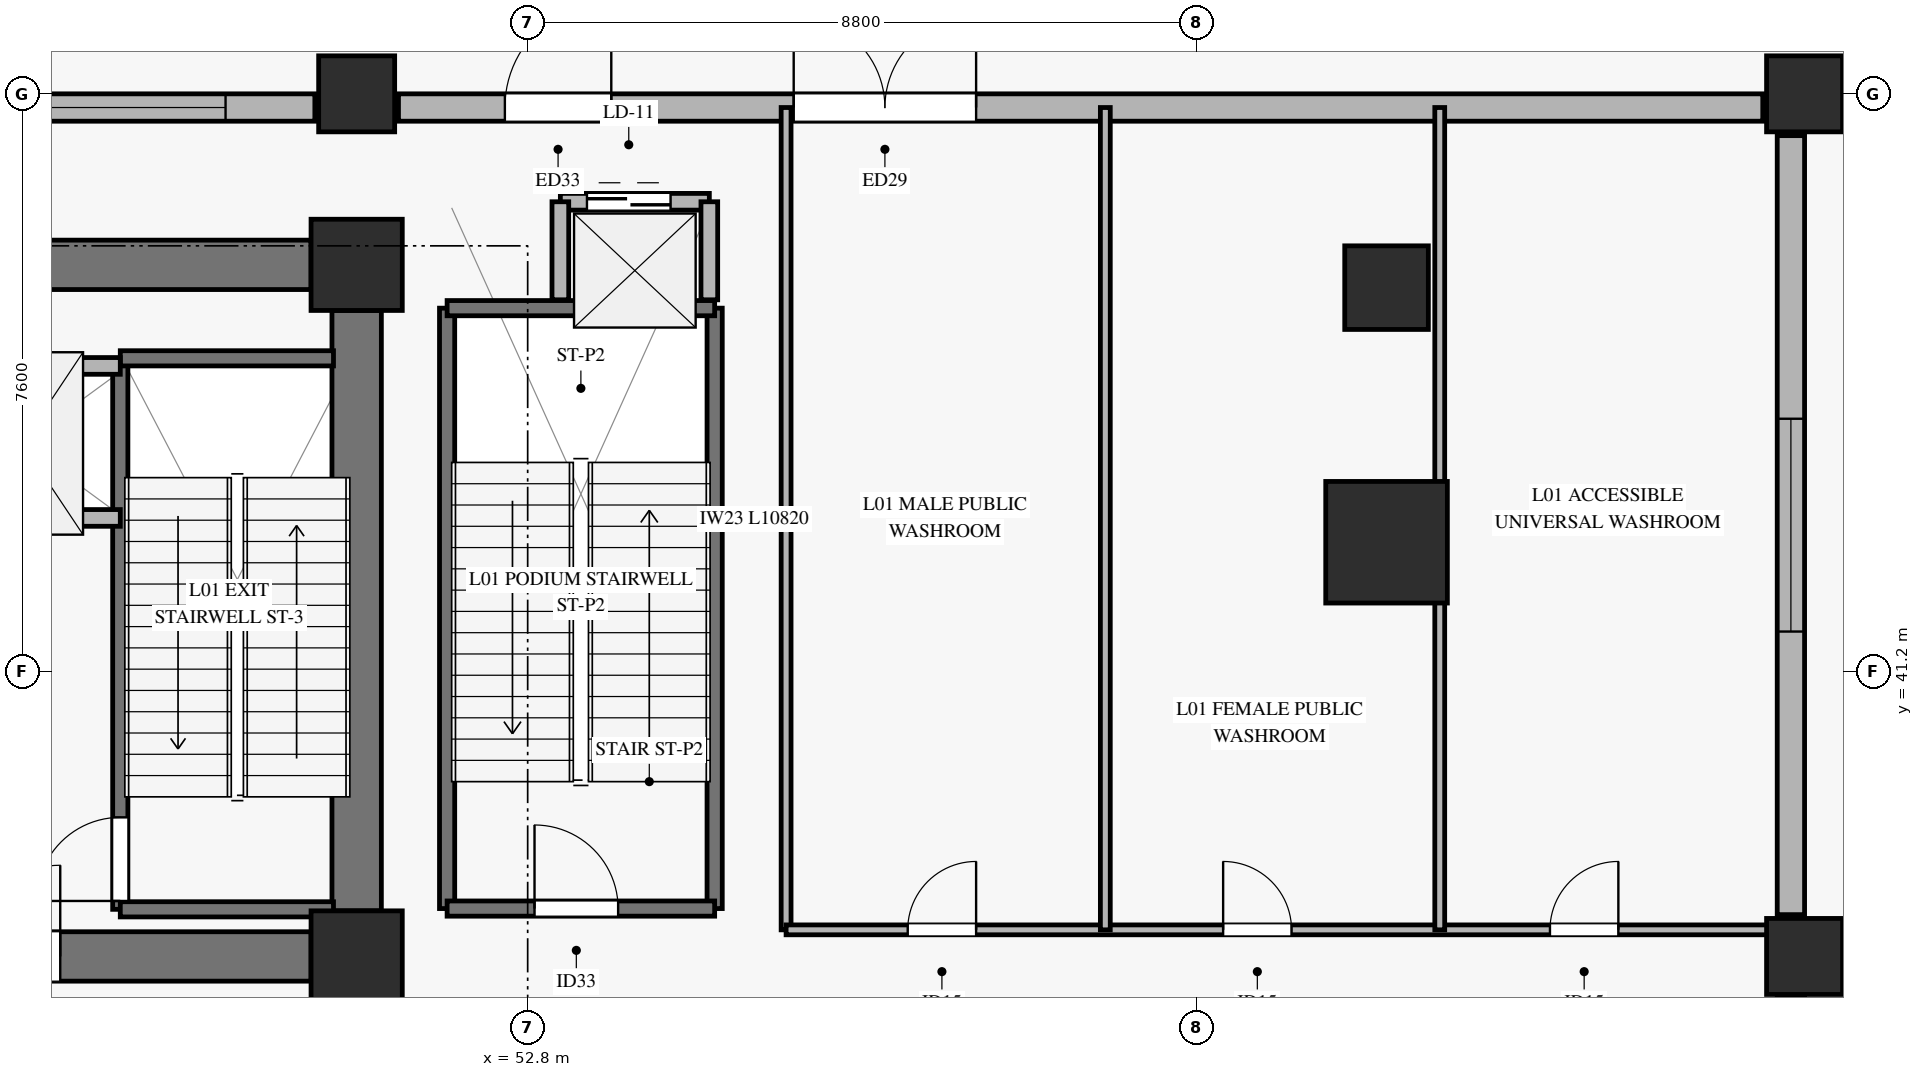
"""IFC4 building model, lengths in metres.
Left out: names, types, materials, properties, quantities, classifications, styles, units other than length and angle.
Written with IfcOpenShell. Run it as: python <this file> out.ifc"""

import sys

from ifc_helpers import new_model, si_unit, direction, frame, frame_2d, origin, origin_2d, place, context, subcontext, project, spatial, rectangle, hollow_rectangle, extrude, source, transform, mapped, element, fill, save


model = new_model("IFC4")
c1 = context("Model", 3, precision=1e-05, world=origin(), true_north=direction((0.0, 1.0)))
c2 = subcontext(c1, "Body", "Model", "MODEL_VIEW")
j1 = project(units=[si_unit("LENGTHUNIT", "METRE"), si_unit("PLANEANGLEUNIT", "RADIAN")], contexts=[c1])
p1 = place(None, origin())
s1 = spatial("IfcSite", under=j1, at=p1, CompositionType="ELEMENT")
p2 = place(p1, origin())
s2 = spatial("IfcBuilding", under=s1, at=p2, CompositionType="ELEMENT")
p3 = place(p2, origin())
s3 = spatial("IfcBuildingStorey", under=s2, at=p3, CompositionType="ELEMENT", Elevation=0.0)
m1 = source(origin(), c2, "Body", "SweptSolid", [
    extrude(rectangle(XDim=1.2, YDim=1.2, at=origin_2d()), origin(), (0.0, 0.0, 1.0), 5.34),
])
for number, where, z_axis, x_axis in (
    (1, (50.55, 37.45, 0.0), (0.0, 0.0, 1.0), (1.0, 0.0, 0.0)),
    (2, (50.55, 46.55, 0.0), (0.0, 0.0, 1.0), (1.0, 0.0, 0.0)),
):
    element("IfcColumn", number, at=place(p3, frame(where, z_axis=z_axis, x_axis=x_axis)), inside=s3, PredefinedType="PILASTER", context=c2, shape_type="MappedRepresentation", body=[
        mapped(m1, transform((0.0, 0.0, 0.0), x_axis=(1.0, 0.0, 0.0), y_axis=(0.0, 1.0, 0.0), z_axis=(0.0, 0.0, 1.0), scale=1.0)),
    ])
p4 = place(p3, frame((44.9, 46.55, 0.0), z_axis=(0.0, 0.0, 1.0), x_axis=(1.0, 0.0, 0.0)))
e3 = element("IfcWall", 3, at=p4, inside=s3, PredefinedType="SHEAR", context=c2, shape_type="SweptSolid", body=[
    extrude(rectangle(XDim=5.05, YDim=0.65, at=frame_2d((2.525, 0.0))), origin(), (0.0, 0.0, 1.0), 5.34),
])
p5 = place(p3, frame((44.9, 37.45, 0.0), z_axis=(0.0, 0.0, 1.0), x_axis=(1.0, 0.0, 0.0)))
e4 = element("IfcWall", 4, at=p5, inside=s3, PredefinedType="SHEAR", context=c2, shape_type="SweptSolid", body=[
    extrude(rectangle(XDim=5.05, YDim=0.65, at=frame_2d((2.525, 0.0))), origin(), (0.0, 0.0, 1.0), 5.34),
])
p6 = place(p5, frame((0.55, 0.0, 0.0)))
e5 = element("IfcOpeningElement", 5, at=p6, cuts=e4, PredefinedType="OPENING", context=c2, shape_type="SweptSolid", body=[
    extrude(rectangle(XDim=1.2, YDim=2.15, at=frame_2d((0.6, 1.075))), frame((0.0, 0.335, 0.0), z_axis=(0.0, -1.0, 0.0), x_axis=(1.0, 0.0, 0.0)), (0.0, 0.0, 1.0), 0.67),
])
p7 = place(p3, frame((50.55, 38.05, 0.0), z_axis=(0.0, 0.0, 1.0), x_axis=(0.0, 1.0, 0.0)))
e6 = element("IfcWall", 6, at=p7, inside=s3, PredefinedType="SHEAR", context=c2, shape_type="SweptSolid", body=[
    extrude(rectangle(XDim=7.9, YDim=0.65, at=frame_2d((3.95, 0.0))), origin(), (0.0, 0.0, 1.0), 5.34),
])
m2 = source(origin(), c2, "Body", "SweptSolid", [
    extrude(hollow_rectangle(XDim=1.6, YDim=1.6, WallThickness=0.075, at=origin_2d()), origin(), (0.0, 0.0, 1.0), 5.34),
])
p8 = place(p3, frame((64.1, 42.9, 0.0), z_axis=(0.0, 0.0, 1.0), x_axis=(1.0, 0.0, 0.0)))
e7 = element("IfcColumn", 7, at=p8, inside=s3, PredefinedType="COLUMN", context=c2, shape_type="MappedRepresentation", body=[
    mapped(m2, transform((0.0, 0.0, 0.0), x_axis=(1.0, 0.0, 0.0), y_axis=(0.0, 1.0, 0.0), z_axis=(0.0, 0.0, 1.0), scale=1.0)),
])
m3 = source(origin(), c2, "Body", "SweptSolid", [
    extrude(hollow_rectangle(XDim=1.1, YDim=1.1, WallThickness=0.05, at=origin_2d()), origin(), (0.0, 0.0, 1.0), 5.34),
])
p9 = place(p3, frame((64.1, 46.25, 0.0), z_axis=(0.0, 0.0, 1.0), x_axis=(1.0, 0.0, 0.0)))
e8 = element("IfcColumn", 8, at=p9, inside=s3, PredefinedType="COLUMN", context=c2, shape_type="MappedRepresentation", body=[
    mapped(m3, transform((0.0, 0.0, 0.0), x_axis=(1.0, 0.0, 0.0), y_axis=(0.0, 1.0, 0.0), z_axis=(0.0, 0.0, 1.0), scale=1.0)),
])
m4 = source(origin(), c2, "Body", "SweptSolid", [
    extrude(hollow_rectangle(XDim=1.0, YDim=1.0, WallThickness=0.045, at=origin_2d()), origin(), (0.0, 0.0, 1.0), 5.34),
])
for number, where, z_axis, x_axis in (
    (9, (69.6, 37.45, 0.0), (0.0, 0.0, 1.0), (1.0, 0.0, 0.0)),
    (10, (50.55, 48.8, 0.0), (0.0, 0.0, 1.0), (1.0, 0.0, 0.0)),
    (11, (69.6, 48.8, 0.0), (0.0, 0.0, 1.0), (1.0, 0.0, 0.0)),
):
    element("IfcColumn", number, at=place(p3, frame(where, z_axis=z_axis, x_axis=x_axis)), inside=s3, PredefinedType="COLUMN", context=c2, shape_type="MappedRepresentation", body=[
        mapped(m4, transform((0.0, 0.0, 0.0), x_axis=(1.0, 0.0, 0.0), y_axis=(0.0, 1.0, 0.0), z_axis=(0.0, 0.0, 1.0), scale=1.0)),
    ])
p10 = place(p3, frame((44.85, 48.62, 0.0), z_axis=(0.0, 0.0, 1.0), x_axis=(1.0, 0.0, 0.0)))
e12 = element("IfcWall", 12, at=p10, inside=s3, PredefinedType="SOLIDWALL", context=c2, shape_type="SweptSolid", body=[
    extrude(rectangle(XDim=5.15, YDim=0.36, at=frame_2d((2.575, 0.0))), origin(), (0.0, 0.0, 1.0), 4.22),
])
p11 = place(p10, frame((1.175, 0.0, 0.72)))
e13 = element("IfcOpeningElement", 13, at=p11, cuts=e12, PredefinedType="OPENING", context=c2, shape_type="SweptSolid", body=[
    extrude(rectangle(XDim=2.8, YDim=2.0, at=frame_2d((1.4, 1.0))), frame((0.0, 0.19, 0.0), z_axis=(0.0, -1.0, 0.0), x_axis=(1.0, 0.0, 0.0)), (0.0, 0.0, 1.0), 0.38),
])
p12 = place(p3, frame((51.1, 48.62, 0.0), z_axis=(0.0, 0.0, 1.0), x_axis=(1.0, 0.0, 0.0)))
e14 = element("IfcWall", 14, at=p12, inside=s3, PredefinedType="SOLIDWALL", context=c2, shape_type="SweptSolid", body=[
    extrude(rectangle(XDim=17.95, YDim=0.36, at=frame_2d((8.975, 0.0))), origin(), (0.0, 0.0, 1.0), 4.22),
])
p13 = place(p12, frame((1.4, 0.0, 0.0)))
e15 = element("IfcOpeningElement", 15, at=p13, cuts=e14, PredefinedType="OPENING", context=c2, shape_type="SweptSolid", body=[
    extrude(rectangle(XDim=1.4, YDim=2.2, at=frame_2d((0.7, 1.1))), frame((0.0, 0.19, 0.0), z_axis=(0.0, -1.0, 0.0), x_axis=(1.0, 0.0, 0.0)), (0.0, 0.0, 1.0), 0.38),
])
p14 = place(p12, frame((5.2, 0.0, 0.0)))
e16 = element("IfcOpeningElement", 16, at=p14, cuts=e14, PredefinedType="OPENING", context=c2, shape_type="SweptSolid", body=[
    extrude(rectangle(XDim=2.4, YDim=2.6, at=frame_2d((1.2, 1.3))), frame((0.0, 0.19, 0.0), z_axis=(0.0, -1.0, 0.0), x_axis=(1.0, 0.0, 0.0)), (0.0, 0.0, 1.0), 0.38),
])
p15 = place(p3, frame((69.42, 38.0, 0.0), z_axis=(0.0, 0.0, 1.0), x_axis=(0.0, 1.0, 0.0)))
e17 = element("IfcWall", 17, at=p15, inside=s3, PredefinedType="SOLIDWALL", context=c2, shape_type="SweptSolid", body=[
    extrude(rectangle(XDim=10.25, YDim=0.36, at=frame_2d((5.125, 0.0))), origin(), (0.0, 0.0, 1.0), 4.22),
])
p16 = place(p15, frame((3.725, 0.0, 0.72)))
e18 = element("IfcOpeningElement", 18, at=p16, cuts=e17, PredefinedType="OPENING", context=c2, shape_type="SweptSolid", body=[
    extrude(rectangle(XDim=2.8, YDim=2.0, at=frame_2d((1.4, 1.0))), frame((0.0, 0.19, 0.0), z_axis=(0.0, -1.0, 0.0), x_axis=(1.0, 0.0, 0.0)), (0.0, 0.0, 1.0), 0.38),
])
p17 = place(p3, frame((47.44, 38.07, 0.0), z_axis=(0.0, 0.0, 1.0), x_axis=(0.0, 1.0, 0.0)))
e19 = element("IfcWall", 19, at=p17, inside=s3, PredefinedType="SOLIDWALL", context=c2, shape_type="SweptSolid", body=[
    extrude(rectangle(XDim=7.25, YDim=0.2, at=frame_2d((3.625, 0.0))), origin(), (0.0, 0.0, 1.0), 5.6),
])
p18 = place(p17, frame((0.11, 0.0, 0.0)))
e20 = element("IfcOpeningElement", 20, at=p18, cuts=e19, PredefinedType="OPENING", context=c2, shape_type="SweptSolid", body=[
    extrude(rectangle(XDim=1.1, YDim=2.15, at=frame_2d((0.55, 1.075))), frame((0.0, 0.11, 0.0), z_axis=(0.0, -1.0, 0.0), x_axis=(1.0, 0.0, 0.0)), (0.0, 0.0, 1.0), 0.22),
])
for number, where, z_axis, x_axis in (
    (21, (47.44, 45.32, 0.0), (0.0, 0.0, 1.0), (1.0, 0.0, 0.0)),
    (22, (47.44, 38.07, 0.0), (0.0, 0.0, 1.0), (1.0, 0.0, 0.0)),
):
    element("IfcWall", number, at=place(p3, frame(where, z_axis=z_axis, x_axis=x_axis)), inside=s3, PredefinedType="SOLIDWALL", context=c2, shape_type="SweptSolid", body=[
        extrude(rectangle(XDim=2.805, YDim=0.2, at=frame_2d((1.403, 0.0))), origin(), (0.0, 0.0, 1.0), 5.6),
    ])
p19 = place(p3, frame((44.72, 43.22, 0.0), z_axis=(0.0, 0.0, 1.0), x_axis=(1.0, 0.0, 0.0)))
e23 = element("IfcWall", 23, at=p19, inside=s3, PredefinedType="SOLIDWALL", context=c2, shape_type="SweptSolid", body=[
    extrude(rectangle(XDim=2.72, YDim=0.22, at=frame_2d((1.36, 0.0))), origin(), (0.0, 0.0, 1.0), 5.34),
])
p20 = place(p19, frame((0.7, 0.0, 0.0)))
e24 = element("IfcOpeningElement", 24, at=p20, cuts=e23, PredefinedType="OPENING", context=c2, shape_type="SweptSolid", body=[
    extrude(rectangle(XDim=1.1, YDim=2.2, at=frame_2d((0.55, 1.1))), frame((0.0, 0.12, 0.0), z_axis=(0.0, -1.0, 0.0), x_axis=(1.0, 0.0, 0.0)), (0.0, 0.0, 1.0), 0.24),
])
p21 = place(p3, frame((44.72, 45.22, 0.0), z_axis=(0.0, 0.0, 1.0), x_axis=(1.0, 0.0, 0.0)))
e25 = element("IfcWall", 25, at=p21, inside=s3, PredefinedType="SOLIDWALL", context=c2, shape_type="SweptSolid", body=[
    extrude(rectangle(XDim=2.72, YDim=0.22, at=frame_2d((1.36, 0.0))), origin(), (0.0, 0.0, 1.0), 5.34),
])
for number, where, z_axis, x_axis in (
    (26, (51.74, 38.08, 0.0), (0.0, 0.0, 1.0), (0.0, 1.0, 0.0)),
    (27, (55.26, 38.08, 0.0), (0.0, 0.0, 1.0), (0.0, 1.0, 0.0)),
):
    element("IfcWall", number, at=place(p3, frame(where, z_axis=z_axis, x_axis=x_axis)), inside=s3, PredefinedType="SOLIDWALL", context=c2, shape_type="SweptSolid", body=[
        extrude(rectangle(XDim=7.9, YDim=0.2, at=frame_2d((3.95, 0.0))), origin(), (0.0, 0.0, 1.0), 5.6),
    ])
p22 = place(p3, frame((51.74, 45.98, 0.0), z_axis=(0.0, 0.0, 1.0), x_axis=(1.0, 0.0, 0.0)))
e28 = element("IfcWall", 28, at=p22, inside=s3, PredefinedType="SOLIDWALL", context=c2, shape_type="SweptSolid", body=[
    extrude(rectangle(XDim=3.52, YDim=0.2, at=frame_2d((1.76, 0.0))), origin(), (0.0, 0.0, 1.0), 5.6),
])
p23 = place(p3, frame((51.74, 38.08, 0.0), z_axis=(0.0, 0.0, 1.0), x_axis=(1.0, 0.0, 0.0)))
e29 = element("IfcWall", 29, at=p23, inside=s3, PredefinedType="SOLIDWALL", context=c2, shape_type="SweptSolid", body=[
    extrude(rectangle(XDim=3.52, YDim=0.2, at=frame_2d((1.76, 0.0))), origin(), (0.0, 0.0, 1.0), 5.6),
])
p24 = place(p23, frame((1.15, 0.0, 0.0)))
e30 = element("IfcOpeningElement", 30, at=p24, cuts=e29, PredefinedType="OPENING", context=c2, shape_type="SweptSolid", body=[
    extrude(rectangle(XDim=1.1, YDim=2.15, at=frame_2d((0.55, 1.075))), frame((0.0, 0.11, 0.0), z_axis=(0.0, -1.0, 0.0), x_axis=(1.0, 0.0, 0.0)), (0.0, 0.0, 1.0), 0.22),
])
p25 = place(p3, frame((53.23, 47.38, 0.0), z_axis=(0.0, 0.0, 1.0), x_axis=(1.0, 0.0, 0.0)))
e31 = element("IfcWall", 31, at=p25, inside=s3, PredefinedType="SOLIDWALL", context=c2, shape_type="SweptSolid", body=[
    extrude(rectangle(XDim=1.96, YDim=0.22, at=frame_2d((0.98, 0.0))), origin(), (0.0, 0.0, 1.0), 5.34),
])
p26 = place(p25, frame((0.35, 0.0, 0.0)))
e32 = element("IfcOpeningElement", 32, at=p26, cuts=e31, PredefinedType="OPENING", context=c2, shape_type="SweptSolid", body=[
    extrude(rectangle(XDim=1.1, YDim=2.2, at=frame_2d((0.55, 1.1))), frame((0.0, 0.12, 0.0), z_axis=(0.0, -1.0, 0.0), x_axis=(1.0, 0.0, 0.0)), (0.0, 0.0, 1.0), 0.24),
])
for number, where, z_axis, x_axis in (
    (33, (53.23, 46.09, 0.0), (0.0, 0.0, 1.0), (0.0, 1.0, 0.0)),
    (34, (55.19, 46.09, 0.0), (0.0, 0.0, 1.0), (0.0, 1.0, 0.0)),
):
    element("IfcWall", number, at=place(p3, frame(where, z_axis=z_axis, x_axis=x_axis)), inside=s3, PredefinedType="SOLIDWALL", context=c2, shape_type="SweptSolid", body=[
        extrude(rectangle(XDim=1.29, YDim=0.22, at=frame_2d((0.645, 0.0))), origin(), (0.0, 0.0, 1.0), 5.34),
    ])
p27 = place(p3, frame((56.2, 37.8, 0.0), z_axis=(0.0, 0.0, 1.0), x_axis=(0.0, 1.0, 0.0)))
e35 = element("IfcWall", 35, at=p27, inside=s3, PredefinedType="PARTITIONING", context=c2, shape_type="SweptSolid", body=[
    extrude(rectangle(XDim=10.82, YDim=0.13, at=frame_2d((5.41, 0.0))), origin(), (0.0, 0.0, 1.0), 5.34),
])
p28 = place(p3, frame((56.2, 37.8, 0.0), z_axis=(0.0, 0.0, 1.0), x_axis=(1.0, 0.0, 0.0)))
e36 = element("IfcWall", 36, at=p28, inside=s3, PredefinedType="PARTITIONING", context=c2, shape_type="SweptSolid", body=[
    extrude(rectangle(XDim=13.22, YDim=0.13, at=frame_2d((6.61, 0.0))), origin(), (0.0, 0.0, 1.0), 4.225),
])
p29 = place(p28, frame((1.6, 0.0, 0.0)))
e37 = element("IfcOpeningElement", 37, at=p29, cuts=e36, PredefinedType="OPENING", context=c2, shape_type="SweptSolid", body=[
    extrude(rectangle(XDim=0.9, YDim=2.1, at=frame_2d((0.45, 1.05))), frame((0.0, 0.075, 0.0), z_axis=(0.0, -1.0, 0.0), x_axis=(1.0, 0.0, 0.0)), (0.0, 0.0, 1.0), 0.15),
])
p30 = place(p28, frame((5.75, 0.0, 0.0)))
e38 = element("IfcOpeningElement", 38, at=p30, cuts=e36, PredefinedType="OPENING", context=c2, shape_type="SweptSolid", body=[
    extrude(rectangle(XDim=0.9, YDim=2.1, at=frame_2d((0.45, 1.05))), frame((0.0, 0.075, 0.0), z_axis=(0.0, -1.0, 0.0), x_axis=(1.0, 0.0, 0.0)), (0.0, 0.0, 1.0), 0.15),
])
p31 = place(p28, frame((10.05, 0.0, 0.0)))
e39 = element("IfcOpeningElement", 39, at=p31, cuts=e36, PredefinedType="OPENING", context=c2, shape_type="SweptSolid", body=[
    extrude(rectangle(XDim=0.9, YDim=2.1, at=frame_2d((0.45, 1.05))), frame((0.0, 0.075, 0.0), z_axis=(0.0, -1.0, 0.0), x_axis=(1.0, 0.0, 0.0)), (0.0, 0.0, 1.0), 0.15),
])
p32 = place(p3, frame((60.4, 37.8, 0.0), z_axis=(0.0, 0.0, 1.0), x_axis=(0.0, 1.0, 0.0)))
e40 = element("IfcWall", 40, at=p32, inside=s3, PredefinedType="PARTITIONING", context=c2, shape_type="SweptSolid", body=[
    extrude(rectangle(XDim=10.82, YDim=0.13, at=frame_2d((5.41, 0.0))), origin(), (0.0, 0.0, 1.0), 5.34),
])
p33 = place(p3, frame((64.8, 37.8, 0.0), z_axis=(0.0, 0.0, 1.0), x_axis=(0.0, 1.0, 0.0)))
e41 = element("IfcWall", 41, at=p33, inside=s3, PredefinedType="PARTITIONING", context=c2, shape_type="SweptSolid", body=[
    extrude(rectangle(XDim=10.82, YDim=0.13, at=frame_2d((5.41, 0.0))), origin(), (0.0, 0.0, 1.0), 4.225),
])
m5 = source(origin(), c2, "Body", "SweptSolid", [
    extrude(rectangle(XDim=2.8, YDim=2.0, at=frame_2d((1.4, 1.0))), frame((0.0, 0.03, 0.0), z_axis=(0.0, -1.0, 0.0), x_axis=(1.0, 0.0, 0.0)), (0.0, 0.0, 1.0), 0.06),
])
p34 = place(p11, origin())
e42 = element("IfcWindow", 42, at=p34, inside=s3, PartitioningType="SINGLE_PANEL", PredefinedType="WINDOW", context=c2, shape_type="MappedRepresentation", body=[
    mapped(m5, transform((0.0, 0.0, 0.0), x_axis=(1.0, 0.0, 0.0), y_axis=(0.0, 1.0, 0.0), z_axis=(0.0, 0.0, 1.0), scale=1.0)),
])
fill(e13, e42)
m6 = source(origin(), c2, "Body", "SweptSolid", [
    extrude(rectangle(XDim=1.4, YDim=2.2, at=frame_2d((0.7, 1.1))), frame((0.0, 0.025, 0.0), z_axis=(0.0, -1.0, 0.0), x_axis=(1.0, 0.0, 0.0)), (0.0, 0.0, 1.0), 0.05),
])
p35 = place(p13, origin())
e43 = element("IfcDoor", 43, at=p35, inside=s3, OperationType="SINGLE_SWING_RIGHT", PredefinedType="DOOR", context=c2, shape_type="MappedRepresentation", body=[
    mapped(m6, transform((0.0, 0.0, 0.0), x_axis=(1.0, 0.0, 0.0), y_axis=(0.0, 1.0, 0.0), z_axis=(0.0, 0.0, 1.0), scale=1.0)),
])
fill(e15, e43)
m7 = source(origin(), c2, "Body", "SweptSolid", [
    extrude(rectangle(XDim=2.4, YDim=2.6, at=frame_2d((1.2, 1.3))), frame((0.0, 0.025, 0.0), z_axis=(0.0, -1.0, 0.0), x_axis=(1.0, 0.0, 0.0)), (0.0, 0.0, 1.0), 0.05),
])
p36 = place(p14, origin())
e44 = element("IfcDoor", 44, at=p36, inside=s3, OperationType="DOUBLE_SWING_LEFT", PredefinedType="DOOR", context=c2, shape_type="MappedRepresentation", body=[
    mapped(m7, transform((0.0, 0.0, 0.0), x_axis=(1.0, 0.0, 0.0), y_axis=(0.0, 1.0, 0.0), z_axis=(0.0, 0.0, 1.0), scale=1.0)),
])
fill(e16, e44)
p37 = place(p16, origin())
e45 = element("IfcWindow", 45, at=p37, inside=s3, PartitioningType="SINGLE_PANEL", PredefinedType="WINDOW", context=c2, shape_type="MappedRepresentation", body=[
    mapped(m5, transform((0.0, 0.0, 0.0), x_axis=(1.0, 0.0, 0.0), y_axis=(0.0, 1.0, 0.0), z_axis=(0.0, 0.0, 1.0), scale=1.0)),
])
fill(e18, e45)
m8 = source(origin(), c2, "Body", "SweptSolid", [
    extrude(rectangle(XDim=1.1, YDim=2.15, at=frame_2d((0.55, 1.075))), frame((0.0, 0.025, 0.0), z_axis=(0.0, -1.0, 0.0), x_axis=(1.0, 0.0, 0.0)), (0.0, 0.0, 1.0), 0.05),
])
p38 = place(p18, origin())
e46 = element("IfcDoor", 46, at=p38, inside=s3, OperationType="SINGLE_SWING_LEFT", PredefinedType="DOOR", context=c2, shape_type="MappedRepresentation", body=[
    mapped(m8, transform((0.0, 0.0, 0.0), x_axis=(1.0, 0.0, 0.0), y_axis=(0.0, 1.0, 0.0), z_axis=(0.0, 0.0, 1.0), scale=1.0)),
])
fill(e20, e46)
m9 = source(origin(), c2, "Body", "SweptSolid", [
    extrude(rectangle(XDim=1.2, YDim=2.15, at=frame_2d((0.6, 1.075))), frame((0.0, 0.025, 0.0), z_axis=(0.0, -1.0, 0.0), x_axis=(1.0, 0.0, 0.0)), (0.0, 0.0, 1.0), 0.05),
])
p39 = place(p6, origin())
e47 = element("IfcDoor", 47, at=p39, inside=s3, OperationType="SINGLE_SWING_RIGHT", PredefinedType="DOOR", context=c2, shape_type="MappedRepresentation", body=[
    mapped(m9, transform((0.0, 0.0, 0.0), x_axis=(1.0, 0.0, 0.0), y_axis=(0.0, 1.0, 0.0), z_axis=(0.0, 0.0, 1.0), scale=1.0)),
])
fill(e5, e47)
p40 = place(p24, origin())
e48 = element("IfcDoor", 48, at=p40, inside=s3, OperationType="SINGLE_SWING_LEFT", PredefinedType="DOOR", context=c2, shape_type="MappedRepresentation", body=[
    mapped(m8, transform((0.0, 0.0, 0.0), x_axis=(1.0, 0.0, 0.0), y_axis=(0.0, 1.0, 0.0), z_axis=(0.0, 0.0, 1.0), scale=1.0)),
])
fill(e30, e48)
m10 = source(origin(), c2, "Body", "SweptSolid", [
    extrude(rectangle(XDim=1.1, YDim=2.2, at=frame_2d((0.55, 1.1))), frame((0.0, 0.025, 0.0), z_axis=(0.0, -1.0, 0.0), x_axis=(1.0, 0.0, 0.0)), (0.0, 0.0, 1.0), 0.05),
])
p41 = place(p26, origin())
e49 = element("IfcDoor", 49, at=p41, inside=s3, OperationType="SLIDING_TO_LEFT", PredefinedType="DOOR", context=c2, shape_type="MappedRepresentation", body=[
    mapped(m10, transform((0.0, 0.0, 0.0), x_axis=(1.0, 0.0, 0.0), y_axis=(0.0, 1.0, 0.0), z_axis=(0.0, 0.0, 1.0), scale=1.0)),
])
fill(e32, e49)
m11 = source(origin(), c2, "Body", "SweptSolid", [
    extrude(rectangle(XDim=0.9, YDim=2.1, at=frame_2d((0.45, 1.05))), frame((0.0, 0.025, 0.0), z_axis=(0.0, -1.0, 0.0), x_axis=(1.0, 0.0, 0.0)), (0.0, 0.0, 1.0), 0.05),
])
p42 = place(p29, origin())
e50 = element("IfcDoor", 50, at=p42, inside=s3, OperationType="SINGLE_SWING_RIGHT", PredefinedType="DOOR", context=c2, shape_type="MappedRepresentation", body=[
    mapped(m11, transform((0.0, 0.0, 0.0), x_axis=(1.0, 0.0, 0.0), y_axis=(0.0, 1.0, 0.0), z_axis=(0.0, 0.0, 1.0), scale=1.0)),
])
fill(e37, e50)
p43 = place(p30, origin())
e51 = element("IfcDoor", 51, at=p43, inside=s3, OperationType="SINGLE_SWING_LEFT", PredefinedType="DOOR", context=c2, shape_type="MappedRepresentation", body=[
    mapped(m11, transform((0.0, 0.0, 0.0), x_axis=(1.0, 0.0, 0.0), y_axis=(0.0, 1.0, 0.0), z_axis=(0.0, 0.0, 1.0), scale=1.0)),
])
fill(e38, e51)
p44 = place(p31, origin())
e52 = element("IfcDoor", 52, at=p44, inside=s3, OperationType="SINGLE_SWING_RIGHT", PredefinedType="DOOR", context=c2, shape_type="MappedRepresentation", body=[
    mapped(m11, transform((0.0, 0.0, 0.0), x_axis=(1.0, 0.0, 0.0), y_axis=(0.0, 1.0, 0.0), z_axis=(0.0, 0.0, 1.0), scale=1.0)),
])
fill(e39, e52)
save(model, sys.argv[1])
